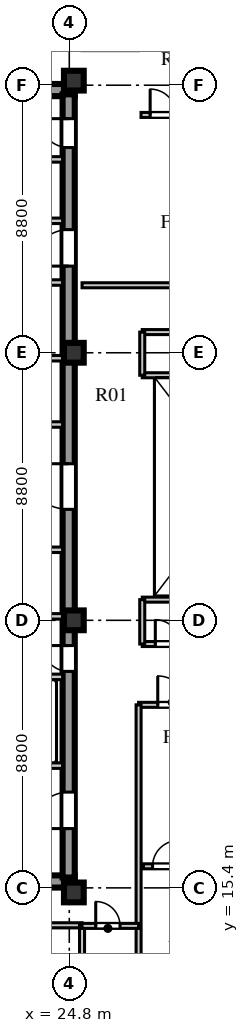
"""IFC4 building model, lengths in metres.
Left out: names, types, materials, properties, quantities, classifications, styles, units other than length and angle.
Written with IfcOpenShell. Run it as: python <this file> out.ifc"""

import sys

from ifc_helpers import new_model, si_unit, direction, frame, frame_2d, origin, origin_2d, place, context, subcontext, project, spatial, rectangle, extrude, element, fill, save


model = new_model("IFC4")
c1 = context("Model", 3, precision=1e-05, world=origin(), true_north=direction((0.0, 1.0)))
c2 = subcontext(c1, "Body", "Model", "MODEL_VIEW")
j1 = project(units=[si_unit("LENGTHUNIT", "METRE"), si_unit("PLANEANGLEUNIT", "RADIAN")], contexts=[c1])
p1 = place(None, origin())
s1 = spatial("IfcSite", under=j1, at=p1, CompositionType="ELEMENT")
p2 = place(p1, origin())
s2 = spatial("IfcBuilding", under=s1, at=p2, CompositionType="ELEMENT")
p3 = place(p2, frame((0.0, 0.0, 327.7)))
s3 = spatial("IfcBuildingStorey", under=s2, at=p3, CompositionType="ELEMENT", Elevation=327.7)
for number, where, z_axis, x_axis in (
    (1, (15.5, 15.61, 0.0), (0.0, 0.0, 1.0), (1.0, 0.0, 0.0)),
    (2, (15.5, 41.64, 0.0), (0.0, 0.0, 1.0), (1.0, 0.0, 0.0)),
):
    element("IfcWall", number, at=place(p3, frame(where, z_axis=z_axis, x_axis=x_axis)), inside=s3, PredefinedType="SHEAR", context=c2, shape_type="SweptSolid", body=[
        extrude(rectangle(XDim=9.48, YDim=0.4, at=frame_2d((4.74, 0.0))), origin(), (0.0, 0.0, 1.0), 3.56),
    ])
p4 = place(p3, frame((24.78, 15.74, 0.0), z_axis=(0.0, 0.0, 1.0), x_axis=(0.0, 1.0, 0.0)))
e3 = element("IfcWall", 3, at=p4, inside=s3, PredefinedType="SHEAR", context=c2, shape_type="SweptSolid", body=[
    extrude(rectangle(XDim=25.76, YDim=0.4, at=frame_2d((12.88, 0.0))), origin(), (0.0, 0.0, 1.0), 3.56),
])
p5 = place(p4, frame((1.61, 0.0, 0.0)))
e4 = element("IfcOpeningElement", 4, at=p5, cuts=e3, PredefinedType="OPENING", context=c2, shape_type="SweptSolid", body=[
    extrude(rectangle(XDim=1.2, YDim=2.1, at=frame_2d((0.6, 1.05))), frame((0.0, 0.21, 0.0), z_axis=(0.0, -1.0, 0.0), x_axis=(1.0, 0.0, 0.0)), (0.0, 0.0, 1.0), 0.42),
])
p6 = place(p4, frame((6.78, 0.0, 0.0)))
e5 = element("IfcOpeningElement", 5, at=p6, cuts=e3, PredefinedType="OPENING", context=c2, shape_type="SweptSolid", body=[
    extrude(rectangle(XDim=0.85, YDim=2.06, at=frame_2d((0.425, 1.03))), frame((0.0, 0.21, 0.0), z_axis=(0.0, -1.0, 0.0), x_axis=(1.0, 0.0, 0.0)), (0.0, 0.0, 1.0), 0.42),
])
p7 = place(p4, frame((12.11, 0.0, 0.0)))
e6 = element("IfcOpeningElement", 6, at=p7, cuts=e3, PredefinedType="OPENING", context=c2, shape_type="SweptSolid", body=[
    extrude(rectangle(XDim=1.5, YDim=2.12, at=frame_2d((0.75, 1.06))), frame((0.0, 0.21, 0.0), z_axis=(0.0, -1.0, 0.0), x_axis=(1.0, 0.0, 0.0)), (0.0, 0.0, 1.0), 0.42),
])
p8 = place(p4, frame((20.11, 0.0, 0.0)))
e7 = element("IfcOpeningElement", 7, at=p8, cuts=e3, PredefinedType="OPENING", context=c2, shape_type="SweptSolid", body=[
    extrude(rectangle(XDim=1.2, YDim=2.12, at=frame_2d((0.6, 1.06))), frame((0.0, 0.21, 0.0), z_axis=(0.0, -1.0, 0.0), x_axis=(1.0, 0.0, 0.0)), (0.0, 0.0, 1.0), 0.42),
])
p9 = place(p4, frame((24.01, 0.0, 0.0)))
e8 = element("IfcOpeningElement", 8, at=p9, cuts=e3, PredefinedType="OPENING", context=c2, shape_type="SweptSolid", body=[
    extrude(rectangle(XDim=0.95, YDim=2.1, at=frame_2d((0.475, 1.05))), frame((0.0, 0.21, 0.0), z_axis=(0.0, -1.0, 0.0), x_axis=(1.0, 0.0, 0.0)), (0.0, 0.0, 1.0), 0.42),
])
for number, where, z_axis, x_axis in (
    (9, (24.95, 15.25, 0.0), (0.0, 0.0, 1.0), (1.0, 0.0, 0.0)),
    (10, (24.95, 24.2, 0.0), (0.0, 0.0, 1.0), (1.0, 0.0, 0.0)),
    (11, (24.95, 33.0, 0.0), (0.0, 0.0, 1.0), (1.0, 0.0, 0.0)),
    (12, (24.95, 41.95, 0.0), (0.0, 0.0, 1.0), (1.0, 0.0, 0.0)),
):
    element("IfcColumn", number, at=place(p3, frame(where, z_axis=z_axis, x_axis=x_axis)), inside=s3, PredefinedType="COLUMN", context=c2, shape_type="SweptSolid", body=[
        extrude(rectangle(XDim=0.65, YDim=0.65, at=origin_2d()), origin(), (0.0, 0.0, 1.0), 3.56),
    ])
p10 = place(p3, frame((19.64, 19.42, 0.0), z_axis=(0.0, 0.0, 1.0), x_axis=(1.0, 0.0, 0.0)))
e13 = element("IfcWall", 13, at=p10, inside=s3, PredefinedType="SOLIDWALL", context=c2, shape_type="SweptSolid", body=[
    extrude(rectangle(XDim=4.94, YDim=0.18, at=frame_2d((2.47, 0.0))), origin(), (0.0, 0.0, 1.0), 3.56),
])
p11 = place(p10, frame((0.72, 0.0, 0.0)))
e14 = element("IfcOpeningElement", 14, at=p11, cuts=e13, PredefinedType="OPENING", context=c2, shape_type="SweptSolid", body=[
    extrude(rectangle(XDim=1.1, YDim=2.1, at=frame_2d((0.55, 1.05))), frame((0.0, 0.1, 0.0), z_axis=(0.0, -1.0, 0.0), x_axis=(1.0, 0.0, 0.0)), (0.0, 0.0, 1.0), 0.2),
])
p12 = place(p10, frame((3.02, 0.0, 0.0)))
e15 = element("IfcOpeningElement", 15, at=p12, cuts=e13, PredefinedType="OPENING", context=c2, shape_type="SweptSolid", body=[
    extrude(rectangle(XDim=1.1, YDim=2.1, at=frame_2d((0.55, 1.05))), frame((0.0, 0.1, 0.0), z_axis=(0.0, -1.0, 0.0), x_axis=(1.0, 0.0, 0.0)), (0.0, 0.0, 1.0), 0.2),
])
p13 = place(p3, frame((19.64, 22.34, 0.0), z_axis=(0.0, 0.0, 1.0), x_axis=(1.0, 0.0, 0.0)))
e16 = element("IfcWall", 16, at=p13, inside=s3, PredefinedType="SOLIDWALL", context=c2, shape_type="SweptSolid", body=[
    extrude(rectangle(XDim=4.94, YDim=0.18, at=frame_2d((2.47, 0.0))), origin(), (0.0, 0.0, 1.0), 3.56),
])
p14 = place(p3, frame((15.9, 26.52, 0.0), z_axis=(0.0, 0.0, 1.0), x_axis=(1.0, 0.0, 0.0)))
e17 = element("IfcWall", 17, at=p14, inside=s3, PredefinedType="SOLIDWALL", context=c2, shape_type="SweptSolid", body=[
    extrude(rectangle(XDim=8.68, YDim=0.18, at=frame_2d((4.34, 0.0))), origin(), (0.0, 0.0, 1.0), 3.56),
])
p15 = place(p14, frame((3.3, 0.0, 0.0)))
e18 = element("IfcOpeningElement", 18, at=p15, cuts=e17, PredefinedType="OPENING", context=c2, shape_type="SweptSolid", body=[
    extrude(rectangle(XDim=0.95, YDim=2.1, at=frame_2d((0.475, 1.05))), frame((0.0, 0.1, 0.0), z_axis=(0.0, -1.0, 0.0), x_axis=(1.0, 0.0, 0.0)), (0.0, 0.0, 1.0), 0.2),
])
p16 = place(p3, frame((15.9, 24.33, 0.0), z_axis=(0.0, 0.0, 1.0), x_axis=(1.0, 0.0, 0.0)))
e19 = element("IfcWall", 19, at=p16, inside=s3, PredefinedType="SOLIDWALL", context=c2, shape_type="SweptSolid", body=[
    extrude(rectangle(XDim=8.68, YDim=0.18, at=frame_2d((4.34, 0.0))), origin(), (0.0, 0.0, 1.0), 2.96),
])
p17 = place(p3, frame((15.9, 30.64, 0.0), z_axis=(0.0, 0.0, 1.0), x_axis=(1.0, 0.0, 0.0)))
e20 = element("IfcWall", 20, at=p17, inside=s3, PredefinedType="SOLIDWALL", context=c2, shape_type="SweptSolid", body=[
    extrude(rectangle(XDim=8.68, YDim=0.18, at=frame_2d((4.34, 0.0))), origin(), (0.0, 0.0, 1.0), 3.56),
])
p18 = place(p17, frame((3.7, 0.0, 0.0)))
e21 = element("IfcOpeningElement", 21, at=p18, cuts=e20, PredefinedType="OPENING", context=c2, shape_type="SweptSolid", body=[
    extrude(rectangle(XDim=0.95, YDim=2.1, at=frame_2d((0.475, 1.05))), frame((0.0, 0.1, 0.0), z_axis=(0.0, -1.0, 0.0), x_axis=(1.0, 0.0, 0.0)), (0.0, 0.0, 1.0), 0.2),
])
p19 = place(p3, frame((15.9, 32.82, 0.0), z_axis=(0.0, 0.0, 1.0), x_axis=(1.0, 0.0, 0.0)))
e22 = element("IfcWall", 22, at=p19, inside=s3, PredefinedType="SOLIDWALL", context=c2, shape_type="SweptSolid", body=[
    extrude(rectangle(XDim=8.68, YDim=0.18, at=frame_2d((4.34, 0.0))), origin(), (0.0, 0.0, 1.0), 2.96),
])
p20 = place(p3, frame((22.02, 35.31, 0.0), z_axis=(0.0, 0.0, 1.0), x_axis=(1.0, 0.0, 0.0)))
e23 = element("IfcWall", 23, at=p20, inside=s3, PredefinedType="SOLIDWALL", context=c2, shape_type="SweptSolid", body=[
    extrude(rectangle(XDim=2.56, YDim=0.18, at=frame_2d((1.28, 0.0))), origin(), (0.0, 0.0, 1.0), 3.56),
])
p21 = place(p20, frame((0.55, 0.0, 0.0)))
e24 = element("IfcOpeningElement", 24, at=p21, cuts=e23, PredefinedType="OPENING", context=c2, shape_type="SweptSolid", body=[
    extrude(rectangle(XDim=1.0, YDim=2.1, at=frame_2d((0.5, 1.05))), frame((0.0, 0.1, 0.0), z_axis=(0.0, -1.0, 0.0), x_axis=(1.0, 0.0, 0.0)), (0.0, 0.0, 1.0), 0.2),
])
p22 = place(p3, frame((19.64, 37.34, 0.0), z_axis=(0.0, 0.0, 1.0), x_axis=(1.0, 0.0, 0.0)))
e25 = element("IfcWall", 25, at=p22, inside=s3, PredefinedType="SOLIDWALL", context=c2, shape_type="SweptSolid", body=[
    extrude(rectangle(XDim=4.94, YDim=0.18, at=frame_2d((2.47, 0.0))), origin(), (0.0, 0.0, 1.0), 3.56),
])
p23 = place(p22, frame((0.45, 0.0, 0.0)))
e26 = element("IfcOpeningElement", 26, at=p23, cuts=e25, PredefinedType="OPENING", context=c2, shape_type="SweptSolid", body=[
    extrude(rectangle(XDim=1.0, YDim=2.1, at=frame_2d((0.5, 1.05))), frame((0.0, 0.1, 0.0), z_axis=(0.0, -1.0, 0.0), x_axis=(1.0, 0.0, 0.0)), (0.0, 0.0, 1.0), 0.2),
])
p24 = place(p22, frame((2.5, 0.0, 0.0)))
e27 = element("IfcOpeningElement", 27, at=p24, cuts=e25, PredefinedType="OPENING", context=c2, shape_type="SweptSolid", body=[
    extrude(rectangle(XDim=1.0, YDim=2.1, at=frame_2d((0.5, 1.05))), frame((0.0, 0.1, 0.0), z_axis=(0.0, -1.0, 0.0), x_axis=(1.0, 0.0, 0.0)), (0.0, 0.0, 1.0), 0.2),
])
p25 = place(p3, frame((19.64, 39.36, 0.0), z_axis=(0.0, 0.0, 1.0), x_axis=(1.0, 0.0, 0.0)))
e28 = element("IfcWall", 28, at=p25, inside=s3, PredefinedType="SOLIDWALL", context=c2, shape_type="SweptSolid", body=[
    extrude(rectangle(XDim=4.94, YDim=0.18, at=frame_2d((2.47, 0.0))), origin(), (0.0, 0.0, 1.0), 3.56),
])
p26 = place(p3, frame((27.08, 21.42, 0.0), z_axis=(0.0, 0.0, 1.0), x_axis=(1.0, 0.0, 0.0)))
e29 = element("IfcWall", 29, at=p26, inside=s3, PredefinedType="PARTITIONING", context=c2, shape_type="SweptSolid", body=[
    extrude(rectangle(XDim=8.17, YDim=0.165, at=frame_2d((4.085, 0.0))), origin(), (0.0, 0.0, 1.0), 3.26),
])
p27 = place(p26, frame((0.63, 0.0, 0.0)))
e30 = element("IfcOpeningElement", 30, at=p27, cuts=e29, PredefinedType="OPENING", context=c2, shape_type="SweptSolid", body=[
    extrude(rectangle(XDim=0.95, YDim=2.1, at=frame_2d((0.475, 1.05))), frame((0.0, 0.093, 0.0), z_axis=(0.0, -1.0, 0.0), x_axis=(1.0, 0.0, 0.0)), (0.0, 0.0, 1.0), 0.185),
])
p28 = place(p3, frame((27.08, 11.28, 0.0), z_axis=(0.0, 0.0, 1.0), x_axis=(0.0, 1.0, 0.0)))
e31 = element("IfcWall", 31, at=p28, inside=s3, PredefinedType="PARTITIONING", context=c2, shape_type="SweptSolid", body=[
    extrude(rectangle(XDim=10.14, YDim=0.165, at=frame_2d((5.07, 0.0))), origin(), (0.0, 0.0, 1.0), 3.56),
])
p29 = place(p3, frame((25.22, 35.22, 0.0), z_axis=(0.0, 0.0, 1.0), x_axis=(1.0, 0.0, 0.0)))
e32 = element("IfcWall", 32, at=p29, inside=s3, PredefinedType="PARTITIONING", context=c2, shape_type="SweptSolid", body=[
    extrude(rectangle(XDim=9.5, YDim=0.165, at=frame_2d((4.75, 0.0))), origin(), (0.0, 0.0, 1.0), 3.56),
])
p30 = place(p29, frame((3.1, 0.0, 0.0)))
e33 = element("IfcOpeningElement", 33, at=p30, cuts=e32, PredefinedType="OPENING", context=c2, shape_type="SweptSolid", body=[
    extrude(rectangle(XDim=0.95, YDim=2.1, at=frame_2d((0.475, 1.05))), frame((0.0, 0.093, 0.0), z_axis=(0.0, -1.0, 0.0), x_axis=(1.0, 0.0, 0.0)), (0.0, 0.0, 1.0), 0.185),
])
p31 = place(p3, frame((13.95, 14.17, 0.0), z_axis=(0.0, 0.0, 1.0), x_axis=(1.0, 0.0, 0.0)))
e34 = element("IfcWall", 34, at=p31, inside=s3, PredefinedType="PARTITIONING", context=c2, shape_type="SweptSolid", body=[
    extrude(rectangle(XDim=11.27, YDim=0.165, at=frame_2d((5.635, 0.0))), origin(), (0.0, 0.0, 1.0), 3.56),
])
p32 = place(p31, frame((3.2, 0.0, 0.0)))
e35 = element("IfcOpeningElement", 35, at=p32, cuts=e34, PredefinedType="OPENING", context=c2, shape_type="SweptSolid", body=[
    extrude(rectangle(XDim=0.95, YDim=2.08, at=frame_2d((0.475, 1.04))), frame((0.0, 0.093, 0.0), z_axis=(0.0, -1.0, 0.0), x_axis=(1.0, 0.0, 0.0)), (0.0, 0.0, 1.0), 0.185),
])
p33 = place(p3, frame((25.22, 11.28, 0.0), z_axis=(0.0, 0.0, 1.0), x_axis=(0.0, 1.0, 0.0)))
e36 = element("IfcWall", 36, at=p33, inside=s3, PredefinedType="PARTITIONING", context=c2, shape_type="SweptSolid", body=[
    extrude(rectangle(XDim=2.89, YDim=0.165, at=frame_2d((1.445, 0.0))), origin(), (0.0, 0.0, 1.0), 3.11),
])
p34 = place(p3, frame((27.24, 16.109, 0.0), z_axis=(0.0, 0.0, 1.0), x_axis=(1.0, 0.0, 0.0)))
e37 = element("IfcWall", 37, at=p34, inside=s3, PredefinedType="PARTITIONING", context=c2, shape_type="SweptSolid", body=[
    extrude(rectangle(XDim=8.16, YDim=0.165, at=frame_2d((4.08, 0.0))), origin(), (0.0, 0.0, 1.0), 3.56),
])
p35 = place(p34, frame((0.3, 0.0, 0.0)))
e38 = element("IfcOpeningElement", 38, at=p35, cuts=e37, PredefinedType="OPENING", context=c2, shape_type="SweptSolid", body=[
    extrude(rectangle(XDim=0.85, YDim=2.08, at=frame_2d((0.425, 1.04))), frame((0.0, 0.093, 0.0), z_axis=(0.0, -1.0, 0.0), x_axis=(1.0, 0.0, 0.0)), (0.0, 0.0, 1.0), 0.185),
])
p36 = place(p34, frame((3.09, 0.0, 0.0)))
e39 = element("IfcOpeningElement", 39, at=p36, cuts=e37, PredefinedType="OPENING", context=c2, shape_type="SweptSolid", body=[
    extrude(rectangle(XDim=0.85, YDim=2.08, at=frame_2d((0.425, 1.04))), frame((0.0, 0.093, 0.0), z_axis=(0.0, -1.0, 0.0), x_axis=(1.0, 0.0, 0.0)), (0.0, 0.0, 1.0), 0.185),
])
p37 = place(p3, frame((27.16, 40.822, 0.0), z_axis=(0.0, 0.0, 1.0), x_axis=(1.0, 0.0, 0.0)))
e40 = element("IfcWall", 40, at=p37, inside=s3, PredefinedType="PARTITIONING", context=c2, shape_type="SweptSolid", body=[
    extrude(rectangle(XDim=7.48, YDim=0.165, at=frame_2d((3.74, 0.0))), origin(), (0.0, 0.0, 1.0), 3.56),
])
p38 = place(p37, frame((0.3, 0.0, 0.0)))
e41 = element("IfcOpeningElement", 41, at=p38, cuts=e40, PredefinedType="OPENING", context=c2, shape_type="SweptSolid", body=[
    extrude(rectangle(XDim=0.85, YDim=2.08, at=frame_2d((0.425, 1.04))), frame((0.0, 0.093, 0.0), z_axis=(0.0, -1.0, 0.0), x_axis=(1.0, 0.0, 0.0)), (0.0, 0.0, 1.0), 0.185),
])
p39 = place(p37, frame((2.75, 0.0, 0.0)))
e42 = element("IfcOpeningElement", 42, at=p39, cuts=e40, PredefinedType="OPENING", context=c2, shape_type="SweptSolid", body=[
    extrude(rectangle(XDim=0.85, YDim=2.08, at=frame_2d((0.425, 1.04))), frame((0.0, 0.093, 0.0), z_axis=(0.0, -1.0, 0.0), x_axis=(1.0, 0.0, 0.0)), (0.0, 0.0, 1.0), 0.185),
])
p40 = place(p3, frame((27.2, 23.42, 0.0), z_axis=(0.0, 0.0, 1.0), x_axis=(1.0, 0.0, 0.0)))
e43 = element("IfcWall", 43, at=p40, inside=s3, PredefinedType="PARTITIONING", context=c2, shape_type="SweptSolid", body=[
    extrude(rectangle(XDim=6.82, YDim=0.165, at=frame_2d((3.41, 0.0))), origin(), (0.0, 0.0, 1.0), 3.56),
])
p41 = place(p40, frame((0.43, 0.0, 0.0)))
e44 = element("IfcOpeningElement", 44, at=p41, cuts=e43, PredefinedType="OPENING", context=c2, shape_type="SweptSolid", body=[
    extrude(rectangle(XDim=0.8, YDim=2.05, at=frame_2d((0.4, 1.025))), frame((0.0, 0.093, 0.0), z_axis=(0.0, -1.0, 0.0), x_axis=(1.0, 0.0, 0.0)), (0.0, 0.0, 1.0), 0.185),
])
p42 = place(p3, frame((27.2, 24.88, 0.0), z_axis=(0.0, 0.0, 1.0), x_axis=(1.0, 0.0, 0.0)))
e45 = element("IfcWall", 45, at=p42, inside=s3, PredefinedType="PARTITIONING", context=c2, shape_type="SweptSolid", body=[
    extrude(rectangle(XDim=6.82, YDim=0.165, at=frame_2d((3.41, 0.0))), origin(), (0.0, 0.0, 1.0), 3.01),
])
p43 = place(p3, frame((27.2, 23.42, 0.0), z_axis=(0.0, 0.0, 1.0), x_axis=(0.0, 1.0, 0.0)))
e46 = element("IfcWall", 46, at=p43, inside=s3, PredefinedType="PARTITIONING", context=c2, shape_type="SweptSolid", body=[
    extrude(rectangle(XDim=1.46, YDim=0.165, at=frame_2d((0.73, 0.0))), origin(), (0.0, 0.0, 1.0), 3.56),
])
p44 = place(p3, frame((25.22, 14.15, 0.0), z_axis=(0.0, 0.0, 1.0), x_axis=(1.0, 0.0, 0.0)))
e47 = element("IfcWall", 47, at=p44, inside=s3, PredefinedType="PARTITIONING", context=c2, shape_type="SweptSolid", body=[
    extrude(rectangle(XDim=1.86, YDim=0.165, at=frame_2d((0.93, 0.0))), origin(), (0.0, 0.0, 1.0), 3.56),
])
p45 = place(p44, frame((0.45, 0.0, 0.0)))
e48 = element("IfcOpeningElement", 48, at=p45, cuts=e47, PredefinedType="OPENING", context=c2, shape_type="SweptSolid", body=[
    extrude(rectangle(XDim=0.8, YDim=2.05, at=frame_2d((0.4, 1.025))), frame((0.0, 0.093, 0.0), z_axis=(0.0, -1.0, 0.0), x_axis=(1.0, 0.0, 0.0)), (0.0, 0.0, 1.0), 0.185),
])
p46 = place(p3, frame((27.2, 33.68, 0.0), z_axis=(0.0, 0.0, 1.0), x_axis=(1.0, 0.0, 0.0)))
e49 = element("IfcWall", 49, at=p46, inside=s3, PredefinedType="PARTITIONING", context=c2, shape_type="SweptSolid", body=[
    extrude(rectangle(XDim=6.2, YDim=0.165, at=frame_2d((3.1, 0.0))), origin(), (0.0, 0.0, 1.0), 3.56),
])
p47 = place(p46, frame((1.2, 0.0, 0.0)))
e50 = element("IfcOpeningElement", 50, at=p47, cuts=e49, PredefinedType="OPENING", context=c2, shape_type="SweptSolid", body=[
    extrude(rectangle(XDim=0.8, YDim=2.05, at=frame_2d((0.4, 1.025))), frame((0.0, 0.093, 0.0), z_axis=(0.0, -1.0, 0.0), x_axis=(1.0, 0.0, 0.0)), (0.0, 0.0, 1.0), 0.185),
])
p48 = place(p3, frame((27.2, 32.26, 0.0), z_axis=(0.0, 0.0, 1.0), x_axis=(1.0, 0.0, 0.0)))
e51 = element("IfcWall", 51, at=p48, inside=s3, PredefinedType="PARTITIONING", context=c2, shape_type="SweptSolid", body=[
    extrude(rectangle(XDim=6.2, YDim=0.165, at=frame_2d((3.1, 0.0))), origin(), (0.0, 0.0, 1.0), 3.01),
])
p49 = place(p3, frame((27.2, 32.26, 0.0), z_axis=(0.0, 0.0, 1.0), x_axis=(0.0, 1.0, 0.0)))
e52 = element("IfcWall", 52, at=p49, inside=s3, PredefinedType="PARTITIONING", context=c2, shape_type="SweptSolid", body=[
    extrude(rectangle(XDim=1.42, YDim=0.165, at=frame_2d((0.71, 0.0))), origin(), (0.0, 0.0, 1.0), 3.56),
])
p50 = place(p5, frame((1.2, 0.0, 0.0), z_axis=(0.0, 0.0, 1.0), x_axis=(-1.0, 0.0, 0.0)))
e53 = element("IfcDoor", 53, at=p50, inside=s3, OperationType="SINGLE_SWING_RIGHT", PredefinedType="DOOR", context=c2, shape_type="SweptSolid", body=[
    extrude(rectangle(XDim=1.2, YDim=2.1, at=frame_2d((0.6, 1.05))), frame((0.0, 0.025, 0.0), z_axis=(0.0, -1.0, 0.0), x_axis=(1.0, 0.0, 0.0)), (0.0, 0.0, 1.0), 0.05),
])
fill(e4, e53)
p51 = place(p6, frame((0.85, 0.0, 0.0), z_axis=(0.0, 0.0, 1.0), x_axis=(-1.0, 0.0, 0.0)))
e54 = element("IfcDoor", 54, at=p51, inside=s3, OperationType="SINGLE_SWING_LEFT", PredefinedType="DOOR", context=c2, shape_type="SweptSolid", body=[
    extrude(rectangle(XDim=0.85, YDim=2.06, at=frame_2d((0.425, 1.03))), frame((0.0, 0.025, 0.0), z_axis=(0.0, -1.0, 0.0), x_axis=(1.0, 0.0, 0.0)), (0.0, 0.0, 1.0), 0.05),
])
fill(e5, e54)
p52 = place(p7, frame((1.5, 0.0, 0.0), z_axis=(0.0, 0.0, 1.0), x_axis=(-1.0, 0.0, 0.0)))
e55 = element("IfcDoor", 55, at=p52, inside=s3, OperationType="SINGLE_SWING_LEFT", PredefinedType="DOOR", context=c2, shape_type="SweptSolid", body=[
    extrude(rectangle(XDim=1.5, YDim=2.12, at=frame_2d((0.75, 1.06))), frame((0.0, 0.025, 0.0), z_axis=(0.0, -1.0, 0.0), x_axis=(1.0, 0.0, 0.0)), (0.0, 0.0, 1.0), 0.05),
])
fill(e6, e55)
p53 = place(p8, frame((1.2, 0.0, 0.0), z_axis=(0.0, 0.0, 1.0), x_axis=(-1.0, 0.0, 0.0)))
e56 = element("IfcDoor", 56, at=p53, inside=s3, OperationType="SINGLE_SWING_RIGHT", PredefinedType="DOOR", context=c2, shape_type="SweptSolid", body=[
    extrude(rectangle(XDim=1.2, YDim=2.12, at=frame_2d((0.6, 1.06))), frame((0.0, 0.025, 0.0), z_axis=(0.0, -1.0, 0.0), x_axis=(1.0, 0.0, 0.0)), (0.0, 0.0, 1.0), 0.05),
])
fill(e7, e56)
p54 = place(p9, frame((0.95, 0.0, 0.0), z_axis=(0.0, 0.0, 1.0), x_axis=(-1.0, 0.0, 0.0)))
e57 = element("IfcDoor", 57, at=p54, inside=s3, OperationType="SINGLE_SWING_LEFT", PredefinedType="DOOR", context=c2, shape_type="SweptSolid", body=[
    extrude(rectangle(XDim=0.95, YDim=2.1, at=frame_2d((0.475, 1.05))), frame((0.0, 0.025, 0.0), z_axis=(0.0, -1.0, 0.0), x_axis=(1.0, 0.0, 0.0)), (0.0, 0.0, 1.0), 0.05),
])
fill(e8, e57)
p55 = place(p35, frame((0.85, 0.0, 0.0), z_axis=(0.0, 0.0, 1.0), x_axis=(-1.0, 0.0, 0.0)))
e58 = element("IfcDoor", 58, at=p55, inside=s3, OperationType="SINGLE_SWING_LEFT", PredefinedType="DOOR", context=c2, shape_type="SweptSolid", body=[
    extrude(rectangle(XDim=0.85, YDim=2.08, at=frame_2d((0.425, 1.04))), frame((0.0, 0.025, 0.0), z_axis=(0.0, -1.0, 0.0), x_axis=(1.0, 0.0, 0.0)), (0.0, 0.0, 1.0), 0.05),
])
fill(e38, e58)
p56 = place(p27, frame((0.95, 0.0, 0.0), z_axis=(0.0, 0.0, 1.0), x_axis=(-1.0, 0.0, 0.0)))
e59 = element("IfcDoor", 59, at=p56, inside=s3, OperationType="SINGLE_SWING_RIGHT", PredefinedType="DOOR", context=c2, shape_type="SweptSolid", body=[
    extrude(rectangle(XDim=0.95, YDim=2.1, at=frame_2d((0.475, 1.05))), frame((0.0, 0.025, 0.0), z_axis=(0.0, -1.0, 0.0), x_axis=(1.0, 0.0, 0.0)), (0.0, 0.0, 1.0), 0.05),
])
fill(e30, e59)
p57 = place(p38, origin())
e60 = element("IfcDoor", 60, at=p57, inside=s3, OperationType="SINGLE_SWING_LEFT", PredefinedType="DOOR", context=c2, shape_type="SweptSolid", body=[
    extrude(rectangle(XDim=0.85, YDim=2.08, at=frame_2d((0.425, 1.04))), frame((0.0, 0.025, 0.0), z_axis=(0.0, -1.0, 0.0), x_axis=(1.0, 0.0, 0.0)), (0.0, 0.0, 1.0), 0.05),
])
fill(e41, e60)
p58 = place(p41, origin())
e61 = element("IfcDoor", 61, at=p58, inside=s3, OperationType="SINGLE_SWING_LEFT", PredefinedType="DOOR", context=c2, shape_type="SweptSolid", body=[
    extrude(rectangle(XDim=0.8, YDim=2.05, at=frame_2d((0.4, 1.025))), frame((0.0, 0.025, 0.0), z_axis=(0.0, -1.0, 0.0), x_axis=(1.0, 0.0, 0.0)), (0.0, 0.0, 1.0), 0.05),
])
fill(e44, e61)
p59 = place(p45, origin())
e62 = element("IfcDoor", 62, at=p59, inside=s3, OperationType="SINGLE_SWING_LEFT", PredefinedType="DOOR", context=c2, shape_type="SweptSolid", body=[
    extrude(rectangle(XDim=0.8, YDim=2.05, at=frame_2d((0.4, 1.025))), frame((0.0, 0.025, 0.0), z_axis=(0.0, -1.0, 0.0), x_axis=(1.0, 0.0, 0.0)), (0.0, 0.0, 1.0), 0.05),
])
fill(e48, e62)
save(model, sys.argv[1])
